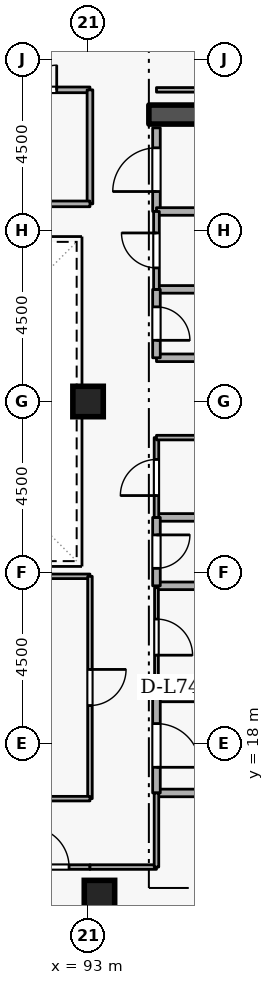
"""IFC4 building model, lengths in metres.
Left out: names, types, materials, properties, quantities, classifications, styles, units other than length and angle.
Written with IfcOpenShell. Run it as: python <this file> out.ifc"""

import sys

from ifc_helpers import new_model, si_unit, direction, frame, frame_2d, origin, origin_2d, place, context, subcontext, project, spatial, rectangle, extrude, element, fill, save


model = new_model("IFC4")
c1 = context("Model", 3, precision=1e-05, world=origin(), true_north=direction((0.0, 1.0)))
c2 = subcontext(c1, "Body", "Model", "MODEL_VIEW")
j1 = project(units=[si_unit("LENGTHUNIT", "METRE"), si_unit("PLANEANGLEUNIT", "RADIAN")], contexts=[c1])
p1 = place(None, origin())
s1 = spatial("IfcSite", under=j1, at=p1, CompositionType="ELEMENT")
p2 = place(p1, origin())
s2 = spatial("IfcBuilding", under=s1, at=p2, CompositionType="ELEMENT")
p3 = place(p2, frame((0.0, 0.0, 276.3)))
s3 = spatial("IfcBuildingStorey", under=s2, at=p3, CompositionType="ELEMENT", Elevation=276.3)
p4 = place(p3, frame((94.6, 34.55, 0.0), z_axis=(0.0, 0.0, 1.0), x_axis=(1.0, 0.0, 0.0)))
e1 = element("IfcWall", 1, at=p4, inside=s3, PredefinedType="SHEAR", context=c2, shape_type="SweptSolid", body=[
    extrude(rectangle(XDim=5.8, YDim=0.5, at=frame_2d((2.9, 0.0))), origin(), (0.0, 0.0, 1.0), 3.6),
])
for number, where, z_axis, x_axis in (
    (2, (93.3, 14.0, 0.0), (0.0, 0.0, 1.0), (1.0, 0.0, 0.0)),
    (3, (93.0, 27.0, 0.0), (0.0, 0.0, 1.0), (1.0, 0.0, 0.0)),
):
    element("IfcColumn", number, at=place(p3, frame(where, z_axis=z_axis, x_axis=x_axis)), inside=s3, PredefinedType="COLUMN", context=c2, shape_type="SweptSolid", body=[
        extrude(rectangle(XDim=0.8, YDim=0.8, at=origin_2d()), origin(), (0.0, 0.0, 1.0), 3.6),
    ])
p5 = place(p3, frame((94.8, 16.7, 0.0), z_axis=(0.0, 0.0, 1.0), x_axis=(1.0, 0.0, 0.0)))
e4 = element("IfcWall", 4, at=p5, inside=s3, PredefinedType="STANDARD", context=c2, shape_type="SweptSolid", body=[
    extrude(rectangle(XDim=5.7, YDim=0.2, at=frame_2d((2.85, 0.0))), origin(), (0.0, 0.0, 1.0), 3.26),
])
p6 = place(p3, frame((97.1, 19.2, 0.0), z_axis=(0.0, 0.0, 1.0), x_axis=(-1.0, 0.0, 0.0)))
e5 = element("IfcWall", 5, at=p6, inside=s3, PredefinedType="STANDARD", context=c2, shape_type="SweptSolid", body=[
    extrude(rectangle(XDim=2.3, YDim=0.2, at=frame_2d((1.15, 0.0))), origin(), (0.0, 0.0, 1.0), 2.465),
])
p7 = place(p3, frame((94.8, 19.2, 0.0), z_axis=(0.0, 0.0, 1.0), x_axis=(0.0, -1.0, 0.0)))
e6 = element("IfcWall", 6, at=p7, inside=s3, PredefinedType="STANDARD", context=c2, shape_type="SweptSolid", body=[
    extrude(rectangle(XDim=2.5, YDim=0.2, at=frame_2d((1.25, 0.0))), origin(), (0.0, 0.0, 1.0), 3.26),
])
p8 = place(p7, frame((0.675, 0.0, 0.0)))
e7 = element("IfcOpeningElement", 7, at=p8, cuts=e6, PredefinedType="OPENING", context=c2, shape_type="SweptSolid", body=[
    extrude(rectangle(XDim=1.15, YDim=2.1, at=frame_2d((0.575, 1.05))), frame((0.0, 0.11, 0.0), z_axis=(0.0, -1.0, 0.0), x_axis=(1.0, 0.0, 0.0)), (0.0, 0.0, 1.0), 0.22),
])
for number, where, z_axis, x_axis in (
    (8, (94.8, 28.15, 0.0), (0.0, 0.0, 1.0), (1.0, 0.0, 0.0)),
    (9, (96.85, 29.95, 0.0), (0.0, 0.0, 1.0), (-1.0, 0.0, 0.0)),
):
    element("IfcWall", number, at=place(p3, frame(where, z_axis=z_axis, x_axis=x_axis)), inside=s3, PredefinedType="STANDARD", context=c2, shape_type="SweptSolid", body=[
        extrude(rectangle(XDim=2.05, YDim=0.2, at=frame_2d((1.025, 0.0))), origin(), (0.0, 0.0, 1.0), 3.26),
    ])
p9 = place(p3, frame((94.8, 29.95, 0.0), z_axis=(0.0, 0.0, 1.0), x_axis=(0.0, -1.0, 0.0)))
e10 = element("IfcWall", 10, at=p9, inside=s3, PredefinedType="STANDARD", context=c2, shape_type="SweptSolid", body=[
    extrude(rectangle(XDim=1.8, YDim=0.2, at=frame_2d((0.9, 0.0))), origin(), (0.0, 0.0, 1.0), 3.26),
])
p10 = place(p9, frame((0.46, 0.0, 0.0)))
e11 = element("IfcOpeningElement", 11, at=p10, cuts=e10, PredefinedType="OPENING", context=c2, shape_type="SweptSolid", body=[
    extrude(rectangle(XDim=0.88, YDim=2.04, at=frame_2d((0.44, 1.02))), frame((0.0, 0.11, 0.0), z_axis=(0.0, -1.0, 0.0), x_axis=(1.0, 0.0, 0.0)), (0.0, 0.0, 1.0), 0.22),
])
for number, where, z_axis, x_axis in (
    (12, (94.8, 22.15, 0.0), (0.0, 0.0, 1.0), (1.0, 0.0, 0.0)),
    (13, (96.85, 23.95, 0.0), (0.0, 0.0, 1.0), (-1.0, 0.0, 0.0)),
):
    element("IfcWall", number, at=place(p3, frame(where, z_axis=z_axis, x_axis=x_axis)), inside=s3, PredefinedType="STANDARD", context=c2, shape_type="SweptSolid", body=[
        extrude(rectangle(XDim=2.05, YDim=0.2, at=frame_2d((1.025, 0.0))), origin(), (0.0, 0.0, 1.0), 3.26),
    ])
p11 = place(p3, frame((94.8, 23.95, 0.0), z_axis=(0.0, 0.0, 1.0), x_axis=(0.0, -1.0, 0.0)))
e14 = element("IfcWall", 14, at=p11, inside=s3, PredefinedType="STANDARD", context=c2, shape_type="SweptSolid", body=[
    extrude(rectangle(XDim=1.8, YDim=0.2, at=frame_2d((0.9, 0.0))), origin(), (0.0, 0.0, 1.0), 3.26),
])
p12 = place(p11, frame((0.46, 0.0, 0.0)))
e15 = element("IfcOpeningElement", 15, at=p12, cuts=e14, PredefinedType="OPENING", context=c2, shape_type="SweptSolid", body=[
    extrude(rectangle(XDim=0.88, YDim=2.04, at=frame_2d((0.44, 1.02))), frame((0.0, 0.11, 0.0), z_axis=(0.0, -1.0, 0.0), x_axis=(1.0, 0.0, 0.0)), (0.0, 0.0, 1.0), 0.22),
])
p13 = place(p3, frame((94.8, 32.0, 0.0), z_axis=(0.0, 0.0, 1.0), x_axis=(0.0, 1.0, 0.0)))
e16 = element("IfcWall", 16, at=p13, inside=s3, PredefinedType="STANDARD", context=c2, shape_type="SweptSolid", body=[
    extrude(rectangle(XDim=2.2, YDim=0.2, at=frame_2d((1.1, 0.0))), origin(), (0.0, 0.0, 1.0), 3.26),
])
p14 = place(p13, frame((0.525, 0.0, 0.0)))
e17 = element("IfcOpeningElement", 17, at=p14, cuts=e16, PredefinedType="OPENING", context=c2, shape_type="SweptSolid", body=[
    extrude(rectangle(XDim=1.15, YDim=2.1, at=frame_2d((0.575, 1.05))), frame((0.0, 0.11, 0.0), z_axis=(0.0, -1.0, 0.0), x_axis=(1.0, 0.0, 0.0)), (0.0, 0.0, 1.0), 0.22),
])
p15 = place(p3, frame((96.85, 32.0, 0.0), z_axis=(0.0, 0.0, 1.0), x_axis=(-1.0, 0.0, 0.0)))
e18 = element("IfcWall", 18, at=p15, inside=s3, PredefinedType="STANDARD", context=c2, shape_type="SweptSolid", body=[
    extrude(rectangle(XDim=2.05, YDim=0.2, at=frame_2d((1.025, 0.0))), origin(), (0.0, 0.0, 1.0), 3.26),
])
p16 = place(p3, frame((94.8, 19.5, 0.0), z_axis=(0.0, 0.0, 1.0), x_axis=(1.0, 0.0, 0.0)))
e19 = element("IfcWall", 19, at=p16, inside=s3, PredefinedType="PARTITIONING", context=c2, shape_type="SweptSolid", body=[
    extrude(rectangle(XDim=2.05, YDim=0.1, at=frame_2d((1.025, 0.0))), origin(), (0.0, 0.0, 1.0), 2.465),
])
p17 = place(p3, frame((94.8, 22.1, 0.0), z_axis=(0.0, 0.0, 1.0), x_axis=(0.0, -1.0, 0.0)))
e20 = element("IfcWall", 20, at=p17, inside=s3, PredefinedType="PARTITIONING", context=c2, shape_type="SweptSolid", body=[
    extrude(rectangle(XDim=2.6, YDim=0.1, at=frame_2d((1.3, 0.0))), origin(), (0.0, 0.0, 1.0), 3.26),
])
p18 = place(p17, frame((0.825, 0.0, 0.0)))
e21 = element("IfcOpeningElement", 21, at=p18, cuts=e20, PredefinedType="OPENING", context=c2, shape_type="SweptSolid", body=[
    extrude(rectangle(XDim=0.95, YDim=2.1, at=frame_2d((0.475, 1.05))), frame((0.0, 0.06, 0.0), z_axis=(0.0, -1.0, 0.0), x_axis=(1.0, 0.0, 0.0)), (0.0, 0.0, 1.0), 0.12),
])
p19 = place(p3, frame((94.8, 23.95, 0.0), z_axis=(0.0, 0.0, 1.0), x_axis=(0.0, 1.0, 0.0)))
e22 = element("IfcWall", 22, at=p19, inside=s3, PredefinedType="PARTITIONING", context=c2, shape_type="SweptSolid", body=[
    extrude(rectangle(XDim=2.1, YDim=0.12, at=frame_2d((1.05, 0.0))), origin(), (0.0, 0.0, 1.0), 3.26),
])
p20 = place(p19, frame((0.575, 0.0, 0.0)))
e23 = element("IfcOpeningElement", 23, at=p20, cuts=e22, PredefinedType="OPENING", context=c2, shape_type="SweptSolid", body=[
    extrude(rectangle(XDim=0.95, YDim=2.1, at=frame_2d((0.475, 1.05))), frame((0.0, 0.07, 0.0), z_axis=(0.0, -1.0, 0.0), x_axis=(1.0, 0.0, 0.0)), (0.0, 0.0, 1.0), 0.14),
])
p21 = place(p3, frame((94.8, 26.05, 0.0), z_axis=(0.0, 0.0, 1.0), x_axis=(1.0, 0.0, 0.0)))
e24 = element("IfcWall", 24, at=p21, inside=s3, PredefinedType="PARTITIONING", context=c2, shape_type="SweptSolid", body=[
    extrude(rectangle(XDim=2.05, YDim=0.12, at=frame_2d((1.025, 0.0))), origin(), (0.0, 0.0, 1.0), 3.26),
])
p22 = place(p3, frame((94.8, 29.95, 0.0), z_axis=(0.0, 0.0, 1.0), x_axis=(0.0, 1.0, 0.0)))
e25 = element("IfcWall", 25, at=p22, inside=s3, PredefinedType="PARTITIONING", context=c2, shape_type="SweptSolid", body=[
    extrude(rectangle(XDim=2.05, YDim=0.15, at=frame_2d((1.025, 0.0))), origin(), (0.0, 0.0, 1.0), 3.26),
])
p23 = place(p22, frame((0.565, 0.0, 0.0)))
e26 = element("IfcOpeningElement", 26, at=p23, cuts=e25, PredefinedType="OPENING", context=c2, shape_type="SweptSolid", body=[
    extrude(rectangle(XDim=0.92, YDim=2.08, at=frame_2d((0.46, 1.04))), frame((0.0, 0.085, 0.0), z_axis=(0.0, -1.0, 0.0), x_axis=(1.0, 0.0, 0.0)), (0.0, 0.0, 1.0), 0.17),
])
p24 = place(p3, frame((94.8, 35.2, 0.0), z_axis=(0.0, 0.0, 1.0), x_axis=(1.0, 0.0, 0.0)))
e27 = element("IfcWall", 27, at=p24, inside=s3, PredefinedType="PARTITIONING", context=c2, shape_type="SweptSolid", body=[
    extrude(rectangle(XDim=5.9, YDim=0.12, at=frame_2d((2.95, 0.0))), origin(), (0.0, 0.0, 1.0), 3.26),
])
p25 = place(p3, frame((90.9, 14.75, 0.0), z_axis=(0.0, 0.0, 1.0), x_axis=(1.0, 0.0, 0.0)))
e28 = element("IfcWall", 28, at=p25, inside=s3, PredefinedType="PARTITIONING", context=c2, shape_type="SweptSolid", body=[
    extrude(rectangle(XDim=2.15, YDim=0.12, at=frame_2d((1.075, 0.0))), origin(), (0.0, 0.0, 1.0), 3.26),
])
p26 = place(p25, frame((0.55, 0.0, 0.0)))
e29 = element("IfcOpeningElement", 29, at=p26, cuts=e28, PredefinedType="OPENING", context=c2, shape_type="SweptSolid", body=[
    extrude(rectangle(XDim=1.05, YDim=2.1, at=frame_2d((0.525, 1.05))), frame((0.0, 0.07, 0.0), z_axis=(0.0, -1.0, 0.0), x_axis=(1.0, 0.0, 0.0)), (0.0, 0.0, 1.0), 0.14),
])
p27 = place(p3, frame((93.05, 14.75, 0.0), z_axis=(0.0, 0.0, 1.0), x_axis=(1.0, 0.0, 0.0)))
e30 = element("IfcWall", 30, at=p27, inside=s3, PredefinedType="PARTITIONING", context=c2, shape_type="SweptSolid", body=[
    extrude(rectangle(XDim=1.75, YDim=0.12, at=frame_2d((0.875, 0.0))), origin(), (0.0, 0.0, 1.0), 3.26),
])
p28 = place(p3, frame((94.8, 14.75, 0.0), z_axis=(0.0, 0.0, 1.0), x_axis=(0.0, 1.0, 0.0)))
e31 = element("IfcWall", 31, at=p28, inside=s3, PredefinedType="PARTITIONING", context=c2, shape_type="SweptSolid", body=[
    extrude(rectangle(XDim=1.95, YDim=0.12, at=frame_2d((0.975, 0.0))), origin(), (0.0, 0.0, 1.0), 3.26),
])
p29 = place(p3, frame((89.3, 22.4, 0.0), z_axis=(0.0, 0.0, 1.0), x_axis=(1.0, 0.0, 0.0)))
e32 = element("IfcWall", 32, at=p29, inside=s3, PredefinedType="PARTITIONING", context=c2, shape_type="SweptSolid", body=[
    extrude(rectangle(XDim=3.75, YDim=0.12, at=frame_2d((1.875, 0.0))), origin(), (0.0, 0.0, 1.0), 3.26),
])
p30 = place(p3, frame((93.05, 22.4, 0.0), z_axis=(0.0, 0.0, 1.0), x_axis=(0.0, -1.0, 0.0)))
e33 = element("IfcWall", 33, at=p30, inside=s3, PredefinedType="PARTITIONING", context=c2, shape_type="SweptSolid", body=[
    extrude(rectangle(XDim=5.85, YDim=0.12, at=frame_2d((2.925, 0.0))), origin(), (0.0, 0.0, 1.0), 3.26),
])
p31 = place(p30, frame((2.45, 0.0, 0.0)))
e34 = element("IfcOpeningElement", 34, at=p31, cuts=e33, PredefinedType="OPENING", context=c2, shape_type="SweptSolid", body=[
    extrude(rectangle(XDim=0.95, YDim=2.1, at=frame_2d((0.475, 1.05))), frame((0.0, 0.07, 0.0), z_axis=(0.0, -1.0, 0.0), x_axis=(1.0, 0.0, 0.0)), (0.0, 0.0, 1.0), 0.14),
])
p32 = place(p3, frame((93.05, 16.55, 0.0), z_axis=(0.0, 0.0, 1.0), x_axis=(-1.0, 0.0, 0.0)))
e35 = element("IfcWall", 35, at=p32, inside=s3, PredefinedType="PARTITIONING", context=c2, shape_type="SweptSolid", body=[
    extrude(rectangle(XDim=3.75, YDim=0.12, at=frame_2d((1.875, 0.0))), origin(), (0.0, 0.0, 1.0), 3.26),
])
p33 = place(p3, frame((90.0, 35.2, 0.0), z_axis=(0.0, 0.0, 1.0), x_axis=(1.0, 0.0, 0.0)))
e36 = element("IfcWall", 36, at=p33, inside=s3, PredefinedType="PARTITIONING", context=c2, shape_type="SweptSolid", body=[
    extrude(rectangle(XDim=3.05, YDim=0.15, at=frame_2d((1.525, 0.0))), origin(), (0.0, 0.0, 1.0), 3.26),
])
p34 = place(p33, frame((0.875, 0.0, 0.0)))
e37 = element("IfcOpeningElement", 37, at=p34, cuts=e36, PredefinedType="OPENING", context=c2, shape_type="SweptSolid", body=[
    extrude(rectangle(XDim=1.3, YDim=2.12, at=frame_2d((0.65, 1.06))), frame((0.0, 0.085, 0.0), z_axis=(0.0, -1.0, 0.0), x_axis=(1.0, 0.0, 0.0)), (0.0, 0.0, 1.0), 0.17),
])
p35 = place(p3, frame((93.05, 35.2, 0.0), z_axis=(0.0, 0.0, 1.0), x_axis=(0.0, -1.0, 0.0)))
e38 = element("IfcWall", 38, at=p35, inside=s3, PredefinedType="PARTITIONING", context=c2, shape_type="SweptSolid", body=[
    extrude(rectangle(XDim=3.0, YDim=0.15, at=frame_2d((1.5, 0.0))), origin(), (0.0, 0.0, 1.0), 3.26),
])
p36 = place(p3, frame((93.05, 32.2, 0.0), z_axis=(0.0, 0.0, 1.0), x_axis=(-1.0, 0.0, 0.0)))
e39 = element("IfcWall", 39, at=p36, inside=s3, PredefinedType="PARTITIONING", context=c2, shape_type="SweptSolid", body=[
    extrude(rectangle(XDim=3.05, YDim=0.15, at=frame_2d((1.525, 0.0))), origin(), (0.0, 0.0, 1.0), 3.26),
])
p37 = place(p8, origin())
e40 = element("IfcDoor", 40, at=p37, inside=s3, OperationType="SINGLE_SWING_RIGHT", PredefinedType="DOOR", context=c2, shape_type="SweptSolid", body=[
    extrude(rectangle(XDim=1.15, YDim=2.1, at=frame_2d((0.575, 1.05))), frame((0.0, 0.025, 0.0), z_axis=(0.0, -1.0, 0.0), x_axis=(1.0, 0.0, 0.0)), (0.0, 0.0, 1.0), 0.05),
])
fill(e7, e40)
p38 = place(p10, origin())
e41 = element("IfcDoor", 41, at=p38, inside=s3, OperationType="SINGLE_SWING_RIGHT", PredefinedType="DOOR", context=c2, shape_type="SweptSolid", body=[
    extrude(rectangle(XDim=0.88, YDim=2.04, at=frame_2d((0.44, 1.02))), frame((0.0, 0.025, 0.0), z_axis=(0.0, -1.0, 0.0), x_axis=(1.0, 0.0, 0.0)), (0.0, 0.0, 1.0), 0.05),
])
fill(e11, e41)
p39 = place(p12, origin())
e42 = element("IfcDoor", 42, at=p39, inside=s3, OperationType="SINGLE_SWING_LEFT", PredefinedType="DOOR", context=c2, shape_type="SweptSolid", body=[
    extrude(rectangle(XDim=0.88, YDim=2.04, at=frame_2d((0.44, 1.02))), frame((0.0, 0.025, 0.0), z_axis=(0.0, -1.0, 0.0), x_axis=(1.0, 0.0, 0.0)), (0.0, 0.0, 1.0), 0.05),
])
fill(e15, e42)
p40 = place(p18, origin())
e43 = element("IfcDoor", 43, at=p40, inside=s3, OperationType="SINGLE_SWING_RIGHT", PredefinedType="DOOR", context=c2, shape_type="SweptSolid", body=[
    extrude(rectangle(XDim=0.95, YDim=2.1, at=frame_2d((0.475, 1.05))), frame((0.0, 0.025, 0.0), z_axis=(0.0, -1.0, 0.0), x_axis=(1.0, 0.0, 0.0)), (0.0, 0.0, 1.0), 0.05),
])
fill(e21, e43)
p41 = place(p20, origin())
e44 = element("IfcDoor", 44, at=p41, inside=s3, OperationType="SINGLE_SWING_LEFT", PredefinedType="DOOR", context=c2, shape_type="SweptSolid", body=[
    extrude(rectangle(XDim=0.95, YDim=2.1, at=frame_2d((0.475, 1.05))), frame((0.0, 0.025, 0.0), z_axis=(0.0, -1.0, 0.0), x_axis=(1.0, 0.0, 0.0)), (0.0, 0.0, 1.0), 0.05),
])
fill(e23, e44)
p42 = place(p23, origin())
e45 = element("IfcDoor", 45, at=p42, inside=s3, OperationType="SINGLE_SWING_RIGHT", PredefinedType="DOOR", context=c2, shape_type="SweptSolid", body=[
    extrude(rectangle(XDim=0.92, YDim=2.08, at=frame_2d((0.46, 1.04))), frame((0.0, 0.025, 0.0), z_axis=(0.0, -1.0, 0.0), x_axis=(1.0, 0.0, 0.0)), (0.0, 0.0, 1.0), 0.05),
])
fill(e26, e45)
p43 = place(p14, origin())
e46 = element("IfcDoor", 46, at=p43, inside=s3, OperationType="SINGLE_SWING_LEFT", PredefinedType="DOOR", context=c2, shape_type="SweptSolid", body=[
    extrude(rectangle(XDim=1.15, YDim=2.1, at=frame_2d((0.575, 1.05))), frame((0.0, 0.025, 0.0), z_axis=(0.0, -1.0, 0.0), x_axis=(1.0, 0.0, 0.0)), (0.0, 0.0, 1.0), 0.05),
])
fill(e17, e46)
p44 = place(p26, origin())
e47 = element("IfcDoor", 47, at=p44, inside=s3, OperationType="SINGLE_SWING_LEFT", PredefinedType="DOOR", context=c2, shape_type="SweptSolid", body=[
    extrude(rectangle(XDim=1.05, YDim=2.1, at=frame_2d((0.525, 1.05))), frame((0.0, 0.025, 0.0), z_axis=(0.0, -1.0, 0.0), x_axis=(1.0, 0.0, 0.0)), (0.0, 0.0, 1.0), 0.05),
])
fill(e29, e47)
p45 = place(p31, origin())
e48 = element("IfcDoor", 48, at=p45, inside=s3, OperationType="SINGLE_SWING_LEFT", PredefinedType="DOOR", context=c2, shape_type="SweptSolid", body=[
    extrude(rectangle(XDim=0.95, YDim=2.1, at=frame_2d((0.475, 1.05))), frame((0.0, 0.025, 0.0), z_axis=(0.0, -1.0, 0.0), x_axis=(1.0, 0.0, 0.0)), (0.0, 0.0, 1.0), 0.05),
])
fill(e34, e48)
p46 = place(p34, origin())
e49 = element("IfcDoor", 49, at=p46, inside=s3, OperationType="DOUBLE_DOOR_SINGLE_SWING", PredefinedType="DOOR", context=c2, shape_type="SweptSolid", body=[
    extrude(rectangle(XDim=1.3, YDim=2.12, at=frame_2d((0.65, 1.06))), frame((0.0, 0.025, 0.0), z_axis=(0.0, -1.0, 0.0), x_axis=(1.0, 0.0, 0.0)), (0.0, 0.0, 1.0), 0.05),
])
fill(e37, e49)
save(model, sys.argv[1])
